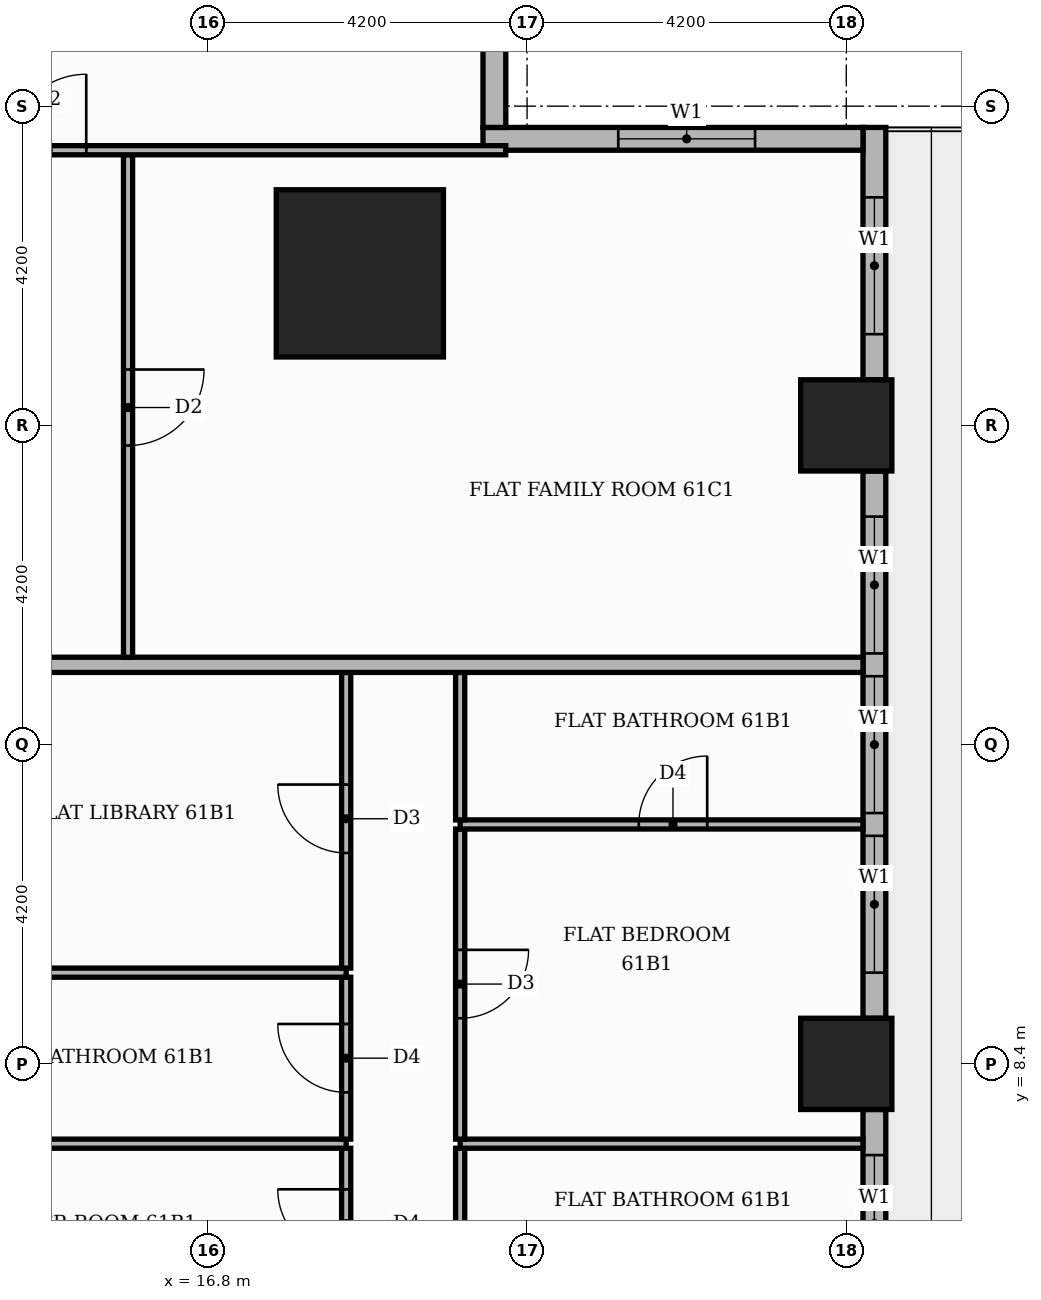
"""IFC4 building model, lengths in metres.
Left out: names, types, materials, properties, quantities, classifications, styles, units other than length and angle.
Written with IfcOpenShell. Run it as: python <this file> out.ifc"""

import sys

from ifc_helpers import new_model, si_unit, direction, frame, frame_2d, origin, origin_2d, place, context, subcontext, project, spatial, rectangle, extrude, element, fill, save


model = new_model("IFC4")
c1 = context("Model", 3, precision=1e-05, world=origin(), true_north=direction((0.0, 1.0)))
c2 = subcontext(c1, "Body", "Model", "MODEL_VIEW")
j1 = project(units=[si_unit("LENGTHUNIT", "METRE"), si_unit("PLANEANGLEUNIT", "RADIAN")], contexts=[c1])
p1 = place(None, origin())
s1 = spatial("IfcSite", under=j1, at=p1, CompositionType="ELEMENT")
p2 = place(p1, origin())
s2 = spatial("IfcBuilding", under=s1, at=p2, CompositionType="ELEMENT")
p3 = place(p2, frame((0.0, 0.0, 256.2)))
s3 = spatial("IfcBuildingStorey", under=s2, at=p3, CompositionType="ELEMENT", Elevation=256.2)
p4 = place(p3, frame((18.8, 18.8, 0.0), z_axis=(0.0, 0.0, 1.0), x_axis=(1.0, 0.0, 0.0)))
e1 = element("IfcColumn", 1, at=p4, inside=s3, PredefinedType="COLUMN", context=c2, shape_type="SweptSolid", body=[
    extrude(rectangle(XDim=2.2, YDim=2.2, at=origin_2d()), origin(), (0.0, 0.0, 1.0), 3.9),
])
for number, where, z_axis, x_axis in (
    (2, (25.2, 8.4, 0.0), (0.0, 0.0, 1.0), (1.0, 0.0, 0.0)),
    (3, (25.2, 16.8, 0.0), (0.0, 0.0, 1.0), (1.0, 0.0, 0.0)),
):
    element("IfcColumn", number, at=place(p3, frame(where, z_axis=z_axis, x_axis=x_axis)), inside=s3, PredefinedType="COLUMN", context=c2, shape_type="SweptSolid", body=[
        extrude(rectangle(XDim=1.2, YDim=1.2, at=origin_2d()), origin(), (0.0, 0.0, 1.0), 3.9),
    ])
p5 = place(p3, frame((25.57, 0.6, 0.0), z_axis=(0.0, 0.0, 1.0), x_axis=(0.0, 1.0, 0.0)))
e4 = element("IfcWall", 4, at=p5, inside=s3, PredefinedType="STANDARD", context=c2, shape_type="SweptSolid", body=[
    extrude(rectangle(XDim=7.2, YDim=0.3, at=frame_2d((3.6, 0.0))), origin(), (0.0, 0.0, 1.0), 3.48),
])
p6 = place(p5, frame((0.6, 0.0, 0.0)))
e5 = element("IfcOpeningElement", 5, at=p6, cuts=e4, PredefinedType="OPENING", context=c2, shape_type="SweptSolid", body=[
    extrude(rectangle(XDim=1.8, YDim=2.4, at=frame_2d((0.9, 1.2))), frame((0.0, 0.16, 0.0), z_axis=(0.0, -1.0, 0.0), x_axis=(1.0, 0.0, 0.0)), (0.0, 0.0, 1.0), 0.32),
])
p7 = place(p5, frame((2.7, 0.0, 0.9)))
e6 = element("IfcOpeningElement", 6, at=p7, cuts=e4, PredefinedType="OPENING", context=c2, shape_type="SweptSolid", body=[
    extrude(rectangle(XDim=1.8, YDim=2.1, at=frame_2d((0.9, 1.05))), frame((0.0, 0.16, 0.0), z_axis=(0.0, -1.0, 0.0), x_axis=(1.0, 0.0, 0.0)), (0.0, 0.0, 1.0), 0.32),
])
p8 = place(p5, frame((4.8, 0.0, 0.9)))
e7 = element("IfcOpeningElement", 7, at=p8, cuts=e4, PredefinedType="OPENING", context=c2, shape_type="SweptSolid", body=[
    extrude(rectangle(XDim=1.8, YDim=2.1, at=frame_2d((0.9, 1.05))), frame((0.0, 0.16, 0.0), z_axis=(0.0, -1.0, 0.0), x_axis=(1.0, 0.0, 0.0)), (0.0, 0.0, 1.0), 0.32),
])
p9 = place(p3, frame((25.57, 9.0, 0.0), z_axis=(0.0, 0.0, 1.0), x_axis=(0.0, 1.0, 0.0)))
e8 = element("IfcWall", 8, at=p9, inside=s3, PredefinedType="STANDARD", context=c2, shape_type="SweptSolid", body=[
    extrude(rectangle(XDim=7.2, YDim=0.3, at=frame_2d((3.6, 0.0))), origin(), (0.0, 0.0, 1.0), 3.48),
])
p10 = place(p9, frame((0.6, 0.0, 0.9)))
e9 = element("IfcOpeningElement", 9, at=p10, cuts=e8, PredefinedType="OPENING", context=c2, shape_type="SweptSolid", body=[
    extrude(rectangle(XDim=1.8, YDim=2.1, at=frame_2d((0.9, 1.05))), frame((0.0, 0.16, 0.0), z_axis=(0.0, -1.0, 0.0), x_axis=(1.0, 0.0, 0.0)), (0.0, 0.0, 1.0), 0.32),
])
p11 = place(p9, frame((2.7, 0.0, 0.9)))
e10 = element("IfcOpeningElement", 10, at=p11, cuts=e8, PredefinedType="OPENING", context=c2, shape_type="SweptSolid", body=[
    extrude(rectangle(XDim=1.8, YDim=2.1, at=frame_2d((0.9, 1.05))), frame((0.0, 0.16, 0.0), z_axis=(0.0, -1.0, 0.0), x_axis=(1.0, 0.0, 0.0)), (0.0, 0.0, 1.0), 0.32),
])
p12 = place(p9, frame((4.8, 0.0, 0.9)))
e11 = element("IfcOpeningElement", 11, at=p12, cuts=e8, PredefinedType="OPENING", context=c2, shape_type="SweptSolid", body=[
    extrude(rectangle(XDim=1.8, YDim=2.1, at=frame_2d((0.9, 1.05))), frame((0.0, 0.16, 0.0), z_axis=(0.0, -1.0, 0.0), x_axis=(1.0, 0.0, 0.0)), (0.0, 0.0, 1.0), 0.32),
])
p13 = place(p3, frame((25.57, 17.4, 0.0), z_axis=(0.0, 0.0, 1.0), x_axis=(0.0, 1.0, 0.0)))
e12 = element("IfcWall", 12, at=p13, inside=s3, PredefinedType="STANDARD", context=c2, shape_type="SweptSolid", body=[
    extrude(rectangle(XDim=3.32, YDim=0.3, at=frame_2d((1.66, 0.0))), origin(), (0.0, 0.0, 1.0), 3.48),
])
p14 = place(p13, frame((0.6, 0.0, 0.9)))
e13 = element("IfcOpeningElement", 13, at=p14, cuts=e12, PredefinedType="OPENING", context=c2, shape_type="SweptSolid", body=[
    extrude(rectangle(XDim=1.8, YDim=2.1, at=frame_2d((0.9, 1.05))), frame((0.0, 0.16, 0.0), z_axis=(0.0, -1.0, 0.0), x_axis=(1.0, 0.0, 0.0)), (0.0, 0.0, 1.0), 0.32),
])
p15 = place(p3, frame((25.42, 20.57, 0.0), z_axis=(0.0, 0.0, 1.0), x_axis=(-1.0, 0.0, 0.0)))
e14 = element("IfcWall", 14, at=p15, inside=s3, PredefinedType="STANDARD", context=c2, shape_type="SweptSolid", body=[
    extrude(rectangle(XDim=5.0, YDim=0.3, at=frame_2d((2.5, 0.0))), origin(), (0.0, 0.0, 1.0), 3.48),
])
p16 = place(p15, frame((1.42, 0.0, 0.9)))
e15 = element("IfcOpeningElement", 15, at=p16, cuts=e14, PredefinedType="OPENING", context=c2, shape_type="SweptSolid", body=[
    extrude(rectangle(XDim=1.8, YDim=2.1, at=frame_2d((0.9, 1.05))), frame((0.0, 0.16, 0.0), z_axis=(0.0, -1.0, 0.0), x_axis=(1.0, 0.0, 0.0)), (0.0, 0.0, 1.0), 0.32),
])
p17 = place(p3, frame((20.57, 20.72, 0.0), z_axis=(0.0, 0.0, 1.0), x_axis=(0.0, 1.0, 0.0)))
e16 = element("IfcWall", 16, at=p17, inside=s3, PredefinedType="STANDARD", context=c2, shape_type="SweptSolid", body=[
    extrude(rectangle(XDim=5.0, YDim=0.3, at=frame_2d((2.5, 0.0))), origin(), (0.0, 0.0, 1.0), 3.48),
])
p18 = place(p17, frame((1.48, 0.0, 0.9)))
e17 = element("IfcOpeningElement", 17, at=p18, cuts=e16, PredefinedType="OPENING", context=c2, shape_type="SweptSolid", body=[
    extrude(rectangle(XDim=1.8, YDim=2.1, at=frame_2d((0.9, 1.05))), frame((0.0, 0.16, 0.0), z_axis=(0.0, -1.0, 0.0), x_axis=(1.0, 0.0, 0.0)), (0.0, 0.0, 1.0), 0.32),
])
p19 = place(p3, frame((18.62, 5.31, 0.0), z_axis=(0.0, 0.0, 1.0), x_axis=(0.0, 1.0, 0.0)))
e18 = element("IfcWall", 18, at=p19, inside=s3, PredefinedType="PARTITIONING", context=c2, shape_type="SweptSolid", body=[
    extrude(rectangle(XDim=1.98, YDim=0.12, at=frame_2d((0.99, 0.0))), origin(), (0.0, 0.0, 1.0), 3.48),
])
p20 = place(p19, frame((0.54, 0.0, 0.0)))
e19 = element("IfcOpeningElement", 19, at=p20, cuts=e18, PredefinedType="OPENING", context=c2, shape_type="SweptSolid", body=[
    extrude(rectangle(XDim=0.9, YDim=2.1, at=frame_2d((0.45, 1.05))), frame((0.0, 0.07, 0.0), z_axis=(0.0, -1.0, 0.0), x_axis=(1.0, 0.0, 0.0)), (0.0, 0.0, 1.0), 0.14),
])
p21 = place(p3, frame((20.12, 5.31, 0.0), z_axis=(0.0, 0.0, 1.0), x_axis=(0.0, 1.0, 0.0)))
e20 = element("IfcWall", 20, at=p21, inside=s3, PredefinedType="PARTITIONING", context=c2, shape_type="SweptSolid", body=[
    extrude(rectangle(XDim=1.98, YDim=0.12, at=frame_2d((0.99, 0.0))), origin(), (0.0, 0.0, 1.0), 3.48),
])
p22 = place(p3, frame((11.0, 7.35, 0.0), z_axis=(0.0, 0.0, 1.0), x_axis=(1.0, 0.0, 0.0)))
e21 = element("IfcWall", 21, at=p22, inside=s3, PredefinedType="PARTITIONING", context=c2, shape_type="SweptSolid", body=[
    extrude(rectangle(XDim=7.62, YDim=0.12, at=frame_2d((3.81, 0.0))), origin(), (0.0, 0.0, 1.0), 3.48),
])
p23 = place(p3, frame((20.12, 7.35, 0.0), z_axis=(0.0, 0.0, 1.0), x_axis=(1.0, 0.0, 0.0)))
e22 = element("IfcWall", 22, at=p23, inside=s3, PredefinedType="PARTITIONING", context=c2, shape_type="SweptSolid", body=[
    extrude(rectangle(XDim=5.3, YDim=0.12, at=frame_2d((2.65, 0.0))), origin(), (0.0, 0.0, 1.0), 3.48),
])
p24 = place(p3, frame((18.62, 7.41, 0.0), z_axis=(0.0, 0.0, 1.0), x_axis=(0.0, 1.0, 0.0)))
e23 = element("IfcWall", 23, at=p24, inside=s3, PredefinedType="PARTITIONING", context=c2, shape_type="SweptSolid", body=[
    extrude(rectangle(XDim=2.13, YDim=0.12, at=frame_2d((1.065, 0.0))), origin(), (0.0, 0.0, 1.0), 3.48),
])
p25 = place(p24, frame((0.615, 0.0, 0.0)))
e24 = element("IfcOpeningElement", 24, at=p25, cuts=e23, PredefinedType="OPENING", context=c2, shape_type="SweptSolid", body=[
    extrude(rectangle(XDim=0.9, YDim=2.1, at=frame_2d((0.45, 1.05))), frame((0.0, 0.07, 0.0), z_axis=(0.0, -1.0, 0.0), x_axis=(1.0, 0.0, 0.0)), (0.0, 0.0, 1.0), 0.14),
])
p26 = place(p3, frame((20.12, 7.41, 0.0), z_axis=(0.0, 0.0, 1.0), x_axis=(0.0, 1.0, 0.0)))
e25 = element("IfcWall", 25, at=p26, inside=s3, PredefinedType="PARTITIONING", context=c2, shape_type="SweptSolid", body=[
    extrude(rectangle(XDim=4.08, YDim=0.12, at=frame_2d((2.04, 0.0))), origin(), (0.0, 0.0, 1.0), 3.48),
])
p27 = place(p26, frame((1.59, 0.0, 0.0)))
e26 = element("IfcOpeningElement", 26, at=p27, cuts=e25, PredefinedType="OPENING", context=c2, shape_type="SweptSolid", body=[
    extrude(rectangle(XDim=0.9, YDim=2.1, at=frame_2d((0.45, 1.05))), frame((0.0, 0.07, 0.0), z_axis=(0.0, -1.0, 0.0), x_axis=(1.0, 0.0, 0.0)), (0.0, 0.0, 1.0), 0.14),
])
p28 = place(p3, frame((11.0, 9.6, 0.0), z_axis=(0.0, 0.0, 1.0), x_axis=(1.0, 0.0, 0.0)))
e27 = element("IfcWall", 27, at=p28, inside=s3, PredefinedType="PARTITIONING", context=c2, shape_type="SweptSolid", body=[
    extrude(rectangle(XDim=7.62, YDim=0.12, at=frame_2d((3.81, 0.0))), origin(), (0.0, 0.0, 1.0), 3.48),
])
p29 = place(p3, frame((18.62, 9.66, 0.0), z_axis=(0.0, 0.0, 1.0), x_axis=(0.0, 1.0, 0.0)))
e28 = element("IfcWall", 28, at=p29, inside=s3, PredefinedType="PARTITIONING", context=c2, shape_type="SweptSolid", body=[
    extrude(rectangle(XDim=3.89, YDim=0.12, at=frame_2d((1.945, 0.0))), origin(), (0.0, 0.0, 1.0), 3.48),
])
p30 = place(p29, frame((1.515, 0.0, 0.0)))
e29 = element("IfcOpeningElement", 29, at=p30, cuts=e28, PredefinedType="OPENING", context=c2, shape_type="SweptSolid", body=[
    extrude(rectangle(XDim=0.9, YDim=2.1, at=frame_2d((0.45, 1.05))), frame((0.0, 0.07, 0.0), z_axis=(0.0, -1.0, 0.0), x_axis=(1.0, 0.0, 0.0)), (0.0, 0.0, 1.0), 0.14),
])
p31 = place(p3, frame((20.12, 11.55, 0.0), z_axis=(0.0, 0.0, 1.0), x_axis=(1.0, 0.0, 0.0)))
e30 = element("IfcWall", 30, at=p31, inside=s3, PredefinedType="PARTITIONING", context=c2, shape_type="SweptSolid", body=[
    extrude(rectangle(XDim=5.3, YDim=0.12, at=frame_2d((2.65, 0.0))), origin(), (0.0, 0.0, 1.0), 3.48),
])
p32 = place(p31, frame((2.35, 0.0, 0.0)))
e31 = element("IfcOpeningElement", 31, at=p32, cuts=e30, PredefinedType="OPENING", context=c2, shape_type="SweptSolid", body=[
    extrude(rectangle(XDim=0.9, YDim=2.1, at=frame_2d((0.45, 1.05))), frame((0.0, 0.07, 0.0), z_axis=(0.0, -1.0, 0.0), x_axis=(1.0, 0.0, 0.0)), (0.0, 0.0, 1.0), 0.14),
])
p33 = place(p3, frame((20.12, 11.61, 0.0), z_axis=(0.0, 0.0, 1.0), x_axis=(0.0, 1.0, 0.0)))
e32 = element("IfcWall", 32, at=p33, inside=s3, PredefinedType="PARTITIONING", context=c2, shape_type="SweptSolid", body=[
    extrude(rectangle(XDim=1.94, YDim=0.12, at=frame_2d((0.97, 0.0))), origin(), (0.0, 0.0, 1.0), 3.48),
])
p34 = place(p3, frame((-13.65, 13.65, 0.0), z_axis=(0.0, 0.0, 1.0), x_axis=(1.0, 0.0, 0.0)))
e33 = element("IfcWall", 33, at=p34, inside=s3, PredefinedType="PARTITIONING", context=c2, shape_type="SweptSolid", body=[
    extrude(rectangle(XDim=39.07, YDim=0.2, at=frame_2d((19.535, 0.0))), origin(), (0.0, 0.0, 1.0), 3.48),
])
p35 = place(p34, frame((24.65, 0.0, 0.0)))
e34 = element("IfcOpeningElement", 34, at=p35, cuts=e33, PredefinedType="OPENING", context=c2, shape_type="SweptSolid", body=[
    extrude(rectangle(XDim=1.1, YDim=2.4, at=frame_2d((0.55, 1.2))), frame((0.0, 0.11, 0.0), z_axis=(0.0, -1.0, 0.0), x_axis=(1.0, 0.0, 0.0)), (0.0, 0.0, 1.0), 0.22),
])
p36 = place(p34, frame((14.15, 0.0, 0.0)))
e35 = element("IfcOpeningElement", 35, at=p36, cuts=e33, PredefinedType="OPENING", context=c2, shape_type="SweptSolid", body=[
    extrude(rectangle(XDim=1.1, YDim=2.4, at=frame_2d((0.55, 1.2))), frame((0.0, 0.11, 0.0), z_axis=(0.0, -1.0, 0.0), x_axis=(1.0, 0.0, 0.0)), (0.0, 0.0, 1.0), 0.22),
])
p37 = place(p3, frame((15.75, 13.75, 0.0), z_axis=(0.0, 0.0, 1.0), x_axis=(0.0, 1.0, 0.0)))
e36 = element("IfcWall", 36, at=p37, inside=s3, PredefinedType="PARTITIONING", context=c2, shape_type="SweptSolid", body=[
    extrude(rectangle(XDim=6.61, YDim=0.12, at=frame_2d((3.305, 0.0))), origin(), (0.0, 0.0, 1.0), 3.48),
])
p38 = place(p37, frame((2.785, 0.0, 0.0)))
e37 = element("IfcOpeningElement", 37, at=p38, cuts=e36, PredefinedType="OPENING", context=c2, shape_type="SweptSolid", body=[
    extrude(rectangle(XDim=1.0, YDim=2.1, at=frame_2d((0.5, 1.05))), frame((0.0, 0.07, 0.0), z_axis=(0.0, -1.0, 0.0), x_axis=(1.0, 0.0, 0.0)), (0.0, 0.0, 1.0), 0.14),
])
p39 = place(p3, frame((5.35, 20.42, 0.0), z_axis=(0.0, 0.0, 1.0), x_axis=(1.0, 0.0, 0.0)))
e38 = element("IfcWall", 38, at=p39, inside=s3, PredefinedType="PARTITIONING", context=c2, shape_type="SweptSolid", body=[
    extrude(rectangle(XDim=15.369, YDim=0.12, at=frame_2d((7.685, 0.0))), origin(), (0.0, 0.0, 1.0), 3.48),
])
p40 = place(p39, frame((8.85, 0.0, 0.0)))
e39 = element("IfcOpeningElement", 39, at=p40, cuts=e38, PredefinedType="OPENING", context=c2, shape_type="SweptSolid", body=[
    extrude(rectangle(XDim=1.0, YDim=2.1, at=frame_2d((0.5, 1.05))), frame((0.0, 0.07, 0.0), z_axis=(0.0, -1.0, 0.0), x_axis=(1.0, 0.0, 0.0)), (0.0, 0.0, 1.0), 0.14),
])
p41 = place(p39, frame((5.75, 0.0, 0.0)))
e40 = element("IfcOpeningElement", 40, at=p41, cuts=e38, PredefinedType="OPENING", context=c2, shape_type="SweptSolid", body=[
    extrude(rectangle(XDim=0.9, YDim=2.1, at=frame_2d((0.45, 1.05))), frame((0.0, 0.07, 0.0), z_axis=(0.0, -1.0, 0.0), x_axis=(1.0, 0.0, 0.0)), (0.0, 0.0, 1.0), 0.14),
])
p42 = place(p8, origin())
e41 = element("IfcWindow", 41, at=p42, inside=s3, PartitioningType="SINGLE_PANEL", PredefinedType="WINDOW", context=c2, shape_type="SweptSolid", body=[
    extrude(rectangle(XDim=1.8, YDim=2.1, at=frame_2d((0.9, 1.05))), frame((0.0, 0.03, 0.0), z_axis=(0.0, -1.0, 0.0), x_axis=(1.0, 0.0, 0.0)), (0.0, 0.0, 1.0), 0.06),
])
fill(e7, e41)
p43 = place(p10, origin())
e42 = element("IfcWindow", 42, at=p43, inside=s3, PartitioningType="SINGLE_PANEL", PredefinedType="WINDOW", context=c2, shape_type="SweptSolid", body=[
    extrude(rectangle(XDim=1.8, YDim=2.1, at=frame_2d((0.9, 1.05))), frame((0.0, 0.03, 0.0), z_axis=(0.0, -1.0, 0.0), x_axis=(1.0, 0.0, 0.0)), (0.0, 0.0, 1.0), 0.06),
])
fill(e9, e42)
p44 = place(p11, origin())
e43 = element("IfcWindow", 43, at=p44, inside=s3, PartitioningType="SINGLE_PANEL", PredefinedType="WINDOW", context=c2, shape_type="SweptSolid", body=[
    extrude(rectangle(XDim=1.8, YDim=2.1, at=frame_2d((0.9, 1.05))), frame((0.0, 0.03, 0.0), z_axis=(0.0, -1.0, 0.0), x_axis=(1.0, 0.0, 0.0)), (0.0, 0.0, 1.0), 0.06),
])
fill(e10, e43)
p45 = place(p12, origin())
e44 = element("IfcWindow", 44, at=p45, inside=s3, PartitioningType="SINGLE_PANEL", PredefinedType="WINDOW", context=c2, shape_type="SweptSolid", body=[
    extrude(rectangle(XDim=1.8, YDim=2.1, at=frame_2d((0.9, 1.05))), frame((0.0, 0.03, 0.0), z_axis=(0.0, -1.0, 0.0), x_axis=(1.0, 0.0, 0.0)), (0.0, 0.0, 1.0), 0.06),
])
fill(e11, e44)
p46 = place(p14, origin())
e45 = element("IfcWindow", 45, at=p46, inside=s3, PartitioningType="SINGLE_PANEL", PredefinedType="WINDOW", context=c2, shape_type="SweptSolid", body=[
    extrude(rectangle(XDim=1.8, YDim=2.1, at=frame_2d((0.9, 1.05))), frame((0.0, 0.03, 0.0), z_axis=(0.0, -1.0, 0.0), x_axis=(1.0, 0.0, 0.0)), (0.0, 0.0, 1.0), 0.06),
])
fill(e13, e45)
p47 = place(p16, origin())
e46 = element("IfcWindow", 46, at=p47, inside=s3, PartitioningType="SINGLE_PANEL", PredefinedType="WINDOW", context=c2, shape_type="SweptSolid", body=[
    extrude(rectangle(XDim=1.8, YDim=2.1, at=frame_2d((0.9, 1.05))), frame((0.0, 0.03, 0.0), z_axis=(0.0, -1.0, 0.0), x_axis=(1.0, 0.0, 0.0)), (0.0, 0.0, 1.0), 0.06),
])
fill(e15, e46)
p48 = place(p20, origin())
e47 = element("IfcDoor", 47, at=p48, inside=s3, OperationType="SINGLE_SWING_RIGHT", PredefinedType="DOOR", context=c2, shape_type="SweptSolid", body=[
    extrude(rectangle(XDim=0.9, YDim=2.1, at=frame_2d((0.45, 1.05))), frame((0.0, 0.025, 0.0), z_axis=(0.0, -1.0, 0.0), x_axis=(1.0, 0.0, 0.0)), (0.0, 0.0, 1.0), 0.05),
])
fill(e19, e47)
p49 = place(p25, origin())
e48 = element("IfcDoor", 48, at=p49, inside=s3, OperationType="SINGLE_SWING_RIGHT", PredefinedType="DOOR", context=c2, shape_type="SweptSolid", body=[
    extrude(rectangle(XDim=0.9, YDim=2.1, at=frame_2d((0.45, 1.05))), frame((0.0, 0.025, 0.0), z_axis=(0.0, -1.0, 0.0), x_axis=(1.0, 0.0, 0.0)), (0.0, 0.0, 1.0), 0.05),
])
fill(e24, e48)
p50 = place(p30, origin())
e49 = element("IfcDoor", 49, at=p50, inside=s3, OperationType="SINGLE_SWING_RIGHT", PredefinedType="DOOR", context=c2, shape_type="SweptSolid", body=[
    extrude(rectangle(XDim=0.9, YDim=2.1, at=frame_2d((0.45, 1.05))), frame((0.0, 0.025, 0.0), z_axis=(0.0, -1.0, 0.0), x_axis=(1.0, 0.0, 0.0)), (0.0, 0.0, 1.0), 0.05),
])
fill(e29, e49)
p51 = place(p27, frame((0.9, 0.0, 0.0), z_axis=(0.0, 0.0, 1.0), x_axis=(-1.0, 0.0, 0.0)))
e50 = element("IfcDoor", 50, at=p51, inside=s3, OperationType="SINGLE_SWING_RIGHT", PredefinedType="DOOR", context=c2, shape_type="SweptSolid", body=[
    extrude(rectangle(XDim=0.9, YDim=2.1, at=frame_2d((0.45, 1.05))), frame((0.0, 0.025, 0.0), z_axis=(0.0, -1.0, 0.0), x_axis=(1.0, 0.0, 0.0)), (0.0, 0.0, 1.0), 0.05),
])
fill(e26, e50)
p52 = place(p32, origin())
e51 = element("IfcDoor", 51, at=p52, inside=s3, OperationType="SINGLE_SWING_RIGHT", PredefinedType="DOOR", context=c2, shape_type="SweptSolid", body=[
    extrude(rectangle(XDim=0.9, YDim=2.1, at=frame_2d((0.45, 1.05))), frame((0.0, 0.025, 0.0), z_axis=(0.0, -1.0, 0.0), x_axis=(1.0, 0.0, 0.0)), (0.0, 0.0, 1.0), 0.05),
])
fill(e31, e51)
p53 = place(p38, frame((1.0, 0.0, 0.0), z_axis=(0.0, 0.0, 1.0), x_axis=(-1.0, 0.0, 0.0)))
e52 = element("IfcDoor", 52, at=p53, inside=s3, OperationType="SINGLE_SWING_RIGHT", PredefinedType="DOOR", context=c2, shape_type="SweptSolid", body=[
    extrude(rectangle(XDim=1.0, YDim=2.1, at=frame_2d((0.5, 1.05))), frame((0.0, 0.025, 0.0), z_axis=(0.0, -1.0, 0.0), x_axis=(1.0, 0.0, 0.0)), (0.0, 0.0, 1.0), 0.05),
])
fill(e37, e52)
p54 = place(p40, origin())
e53 = element("IfcDoor", 53, at=p54, inside=s3, OperationType="SINGLE_SWING_RIGHT", PredefinedType="DOOR", context=c2, shape_type="SweptSolid", body=[
    extrude(rectangle(XDim=1.0, YDim=2.1, at=frame_2d((0.5, 1.05))), frame((0.0, 0.025, 0.0), z_axis=(0.0, -1.0, 0.0), x_axis=(1.0, 0.0, 0.0)), (0.0, 0.0, 1.0), 0.05),
])
fill(e39, e53)
save(model, sys.argv[1])
